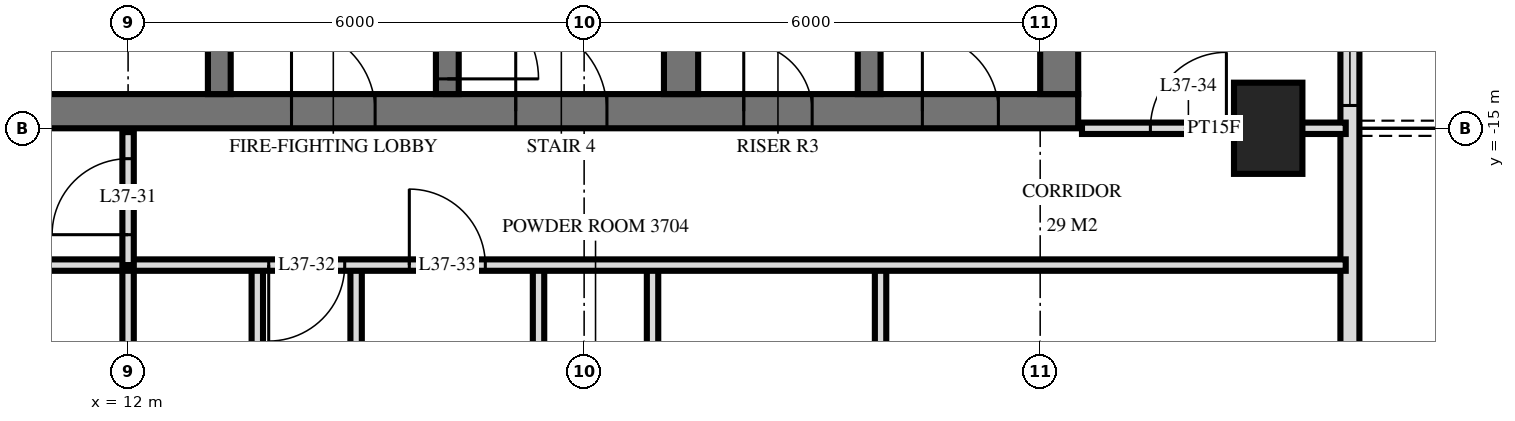
"""IFC4 building model, lengths in metres.
Left out: names, types, materials, properties, quantities, classifications, styles, units other than length and angle.
Written with IfcOpenShell. Run it as: python <this file> out.ifc"""

import sys

from ifc_helpers import new_model, si_unit, direction, frame, frame_2d, origin, origin_2d, place, context, subcontext, project, spatial, rectangle, extrude, element, fill, save


model = new_model("IFC4")
c1 = context("Model", 3, precision=1e-05, world=origin(), true_north=direction((0.0, 1.0)))
c2 = subcontext(c1, "Body", "Model", "MODEL_VIEW")
j1 = project(units=[si_unit("LENGTHUNIT", "METRE"), si_unit("PLANEANGLEUNIT", "RADIAN")], contexts=[c1])
p1 = place(None, origin())
s1 = spatial("IfcSite", under=j1, at=p1, CompositionType="ELEMENT")
p2 = place(p1, origin())
s2 = spatial("IfcBuilding", under=s1, at=p2, CompositionType="ELEMENT")
p3 = place(p2, frame((0.0, 0.0, 145.2)))
s3 = spatial("IfcBuildingStorey", under=s2, at=p3, CompositionType="ELEMENT", Elevation=145.2)
p4 = place(p3, frame((27.0, -15.0, 0.0), z_axis=(0.0, 0.0, 1.0), x_axis=(0.0, 1.0, 0.0)))
e1 = element("IfcColumn", 1, at=p4, inside=s3, PredefinedType="COLUMN", context=c2, shape_type="SweptSolid", body=[
    extrude(rectangle(XDim=1.2, YDim=0.9, at=origin_2d()), origin(), (0.0, 0.0, 1.0), 3.6),
])
p5 = place(p3, frame((10.0, -14.775, 0.0), z_axis=(0.0, 0.0, 1.0), x_axis=(1.0, 0.0, 0.0)))
e2 = element("IfcWall", 2, at=p5, inside=s3, PredefinedType="SHEAR", context=c2, shape_type="SweptSolid", body=[
    extrude(rectangle(XDim=14.5, YDim=0.45, at=frame_2d((7.25, 0.0))), origin(), (0.0, 0.0, 1.0), 3.6),
])
p6 = place(p5, frame((7.1, 0.0, 0.0)))
e3 = element("IfcOpeningElement", 3, at=p6, cuts=e2, PredefinedType="OPENING", context=c2, shape_type="SweptSolid", body=[
    extrude(rectangle(XDim=1.2, YDim=2.1, at=frame_2d((0.6, 1.05))), frame((0.0, 0.235, 0.0), z_axis=(0.0, -1.0, 0.0), x_axis=(1.0, 0.0, 0.0)), (0.0, 0.0, 1.0), 0.47),
])
p7 = place(p5, frame((4.15, 0.0, 0.0)))
e4 = element("IfcOpeningElement", 4, at=p7, cuts=e2, PredefinedType="OPENING", context=c2, shape_type="SweptSolid", body=[
    extrude(rectangle(XDim=1.1, YDim=2.1, at=frame_2d((0.55, 1.05))), frame((0.0, 0.235, 0.0), z_axis=(0.0, -1.0, 0.0), x_axis=(1.0, 0.0, 0.0)), (0.0, 0.0, 1.0), 0.47),
])
p8 = place(p5, frame((10.1, 0.0, 0.0)))
e5 = element("IfcOpeningElement", 5, at=p8, cuts=e2, PredefinedType="OPENING", context=c2, shape_type="SweptSolid", body=[
    extrude(rectangle(XDim=0.9, YDim=2.1, at=frame_2d((0.45, 1.05))), frame((0.0, 0.235, 0.0), z_axis=(0.0, -1.0, 0.0), x_axis=(1.0, 0.0, 0.0)), (0.0, 0.0, 1.0), 0.47),
])
p9 = place(p5, frame((12.45, 0.0, 0.0)))
e6 = element("IfcOpeningElement", 6, at=p9, cuts=e2, PredefinedType="OPENING", context=c2, shape_type="SweptSolid", body=[
    extrude(rectangle(XDim=1.0, YDim=2.1, at=frame_2d((0.5, 1.05))), frame((0.0, 0.235, 0.0), z_axis=(0.0, -1.0, 0.0), x_axis=(1.0, 0.0, 0.0)), (0.0, 0.0, 1.0), 0.47),
])
p10 = place(p3, frame((24.25, -14.55, 0.0), z_axis=(0.0, 0.0, 1.0), x_axis=(0.0, 1.0, 0.0)))
e7 = element("IfcWall", 7, at=p10, inside=s3, PredefinedType="SHEAR", context=c2, shape_type="SweptSolid", body=[
    extrude(rectangle(XDim=14.1, YDim=0.5, at=frame_2d((7.05, 0.0))), origin(), (0.0, 0.0, 1.0), 3.6),
])
p11 = place(p3, frame((13.2, -14.55, 0.0), z_axis=(0.0, 0.0, 1.0), x_axis=(0.0, 1.0, 0.0)))
e8 = element("IfcWall", 8, at=p11, inside=s3, PredefinedType="SHEAR", context=c2, shape_type="SweptSolid", body=[
    extrude(rectangle(XDim=5.4, YDim=0.3, at=frame_2d((2.7, 0.0))), origin(), (0.0, 0.0, 1.0), 3.6),
])
p12 = place(p11, frame((4.0, 0.0, 0.0)))
e9 = element("IfcOpeningElement", 9, at=p12, cuts=e8, PredefinedType="OPENING", context=c2, shape_type="SweptSolid", body=[
    extrude(rectangle(XDim=1.2, YDim=2.1, at=frame_2d((0.6, 1.05))), frame((0.0, 0.16, 0.0), z_axis=(0.0, -1.0, 0.0), x_axis=(1.0, 0.0, 0.0)), (0.0, 0.0, 1.0), 0.32),
])
p13 = place(p3, frame((16.2, -14.55, 0.0), z_axis=(0.0, 0.0, 1.0), x_axis=(0.0, 1.0, 0.0)))
e10 = element("IfcWall", 10, at=p13, inside=s3, PredefinedType="SHEAR", context=c2, shape_type="SweptSolid", body=[
    extrude(rectangle(XDim=5.4, YDim=0.3, at=frame_2d((2.7, 0.0))), origin(), (0.0, 0.0, 1.0), 3.6),
])
p14 = place(p13, frame((0.2, 0.0, 0.0)))
e11 = element("IfcOpeningElement", 11, at=p14, cuts=e10, PredefinedType="OPENING", context=c2, shape_type="SweptSolid", body=[
    extrude(rectangle(XDim=1.2, YDim=2.1, at=frame_2d((0.6, 1.05))), frame((0.0, 0.16, 0.0), z_axis=(0.0, -1.0, 0.0), x_axis=(1.0, 0.0, 0.0)), (0.0, 0.0, 1.0), 0.32),
])
p15 = place(p3, frame((19.275, -14.55, 0.0), z_axis=(0.0, 0.0, 1.0), x_axis=(0.0, 1.0, 0.0)))
e12 = element("IfcWall", 12, at=p15, inside=s3, PredefinedType="SHEAR", context=c2, shape_type="SweptSolid", body=[
    extrude(rectangle(XDim=5.4, YDim=0.45, at=frame_2d((2.7, 0.0))), origin(), (0.0, 0.0, 1.0), 3.6),
])
p16 = place(p3, frame((21.75, -14.55, 0.0), z_axis=(0.0, 0.0, 1.0), x_axis=(0.0, 1.0, 0.0)))
e13 = element("IfcWall", 13, at=p16, inside=s3, PredefinedType="SHEAR", context=c2, shape_type="SweptSolid", body=[
    extrude(rectangle(XDim=5.4, YDim=0.3, at=frame_2d((2.7, 0.0))), origin(), (0.0, 0.0, 1.0), 3.6),
])
p17 = place(p3, frame((28.075, -29.275, 0.0), z_axis=(0.0, 0.0, 1.0), x_axis=(0.0, 1.0, 0.0)))
e14 = element("IfcWall", 14, at=p17, inside=s3, PredefinedType="SOLIDWALL", context=c2, shape_type="SweptSolid", body=[
    extrude(rectangle(XDim=25.951, YDim=0.25, at=frame_2d((12.975, 0.0))), origin(), (0.0, 0.0, 1.0), 3.32),
])
p18 = place(p17, frame((0.575, 0.0, 0.0)))
e15 = element("IfcOpeningElement", 15, at=p18, cuts=e14, PredefinedType="OPENING", context=c2, shape_type="SweptSolid", body=[
    extrude(rectangle(XDim=1.8, YDim=2.4, at=frame_2d((0.9, 1.2))), frame((0.0, 0.135, 0.0), z_axis=(0.0, -1.0, 0.0), x_axis=(1.0, 0.0, 0.0)), (0.0, 0.0, 1.0), 0.27),
])
p19 = place(p17, frame((3.325, 0.0, 0.3)))
e16 = element("IfcOpeningElement", 16, at=p19, cuts=e14, PredefinedType="OPENING", context=c2, shape_type="SweptSolid", body=[
    extrude(rectangle(XDim=1.8, YDim=2.1, at=frame_2d((0.9, 1.05))), frame((0.0, 0.135, 0.0), z_axis=(0.0, -1.0, 0.0), x_axis=(1.0, 0.0, 0.0)), (0.0, 0.0, 1.0), 0.27),
])
p20 = place(p17, frame((9.475, 0.0, 0.0)))
e17 = element("IfcOpeningElement", 17, at=p20, cuts=e14, PredefinedType="OPENING", context=c2, shape_type="SweptSolid", body=[
    extrude(rectangle(XDim=1.8, YDim=2.4, at=frame_2d((0.9, 1.2))), frame((0.0, 0.135, 0.0), z_axis=(0.0, -1.0, 0.0), x_axis=(1.0, 0.0, 0.0)), (0.0, 0.0, 1.0), 0.27),
])
p21 = place(p17, frame((14.575, 0.0, 0.3)))
e18 = element("IfcOpeningElement", 18, at=p21, cuts=e14, PredefinedType="OPENING", context=c2, shape_type="SweptSolid", body=[
    extrude(rectangle(XDim=2.4, YDim=2.1, at=frame_2d((1.2, 1.05))), frame((0.0, 0.135, 0.0), z_axis=(0.0, -1.0, 0.0), x_axis=(1.0, 0.0, 0.0)), (0.0, 0.0, 1.0), 0.27),
])
p22 = place(p17, frame((17.875, 0.0, 0.0)))
e19 = element("IfcOpeningElement", 19, at=p22, cuts=e14, PredefinedType="OPENING", context=c2, shape_type="SweptSolid", body=[
    extrude(rectangle(XDim=1.8, YDim=2.4, at=frame_2d((0.9, 1.2))), frame((0.0, 0.135, 0.0), z_axis=(0.0, -1.0, 0.0), x_axis=(1.0, 0.0, 0.0)), (0.0, 0.0, 1.0), 0.27),
])
p23 = place(p3, frame((21.9, -21.0, 0.0), z_axis=(0.0, 0.0, 1.0), x_axis=(0.0, 1.0, 0.0)))
e20 = element("IfcWall", 20, at=p23, inside=s3, PredefinedType="PARTITIONING", context=c2, shape_type="SweptSolid", body=[
    extrude(rectangle(XDim=4.2, YDim=0.15, at=frame_2d((2.1, 0.0))), origin(), (0.0, 0.0, 1.0), 3.32),
])
p24 = place(p3, frame((18.9, -21.0, 0.0), z_axis=(0.0, 0.0, 1.0), x_axis=(0.0, 1.0, 0.0)))
e21 = element("IfcWall", 21, at=p24, inside=s3, PredefinedType="PLUMBINGWALL", context=c2, shape_type="SweptSolid", body=[
    extrude(rectangle(XDim=4.2, YDim=0.15, at=frame_2d((2.1, 0.0))), origin(), (0.0, 0.0, 1.0), 3.32),
])
p25 = place(p3, frame((17.4, -21.0, 0.0), z_axis=(0.0, 0.0, 1.0), x_axis=(0.0, 1.0, 0.0)))
e22 = element("IfcWall", 22, at=p25, inside=s3, PredefinedType="PARTITIONING", context=c2, shape_type="SweptSolid", body=[
    extrude(rectangle(XDim=4.2, YDim=0.15, at=frame_2d((2.1, 0.0))), origin(), (0.0, 0.0, 1.0), 3.32),
])
p26 = place(p25, frame((1.6, 0.0, 0.0)))
e23 = element("IfcOpeningElement", 23, at=p26, cuts=e22, PredefinedType="OPENING", context=c2, shape_type="SweptSolid", body=[
    extrude(rectangle(XDim=1.0, YDim=2.1, at=frame_2d((0.5, 1.05))), frame((0.0, 0.085, 0.0), z_axis=(0.0, -1.0, 0.0), x_axis=(1.0, 0.0, 0.0)), (0.0, 0.0, 1.0), 0.17),
])
p27 = place(p3, frame((15.0, -21.0, 0.0), z_axis=(0.0, 0.0, 1.0), x_axis=(0.0, 1.0, 0.0)))
e24 = element("IfcWall", 24, at=p27, inside=s3, PredefinedType="PARTITIONING", context=c2, shape_type="SweptSolid", body=[
    extrude(rectangle(XDim=4.2, YDim=0.15, at=frame_2d((2.1, 0.0))), origin(), (0.0, 0.0, 1.0), 3.32),
])
p28 = place(p3, frame((13.7, -21.8, 0.0), z_axis=(0.0, 0.0, 1.0), x_axis=(0.0, 1.0, 0.0)))
e25 = element("IfcWall", 25, at=p28, inside=s3, PredefinedType="PARTITIONING", context=c2, shape_type="SweptSolid", body=[
    extrude(rectangle(XDim=5.0, YDim=0.15, at=frame_2d((2.5, 0.0))), origin(), (0.0, 0.0, 1.0), 3.32),
])
p29 = place(p28, frame((2.1, 0.0, 0.0)))
e26 = element("IfcOpeningElement", 26, at=p29, cuts=e25, PredefinedType="OPENING", context=c2, shape_type="SweptSolid", body=[
    extrude(rectangle(XDim=0.8, YDim=2.1, at=frame_2d((0.4, 1.05))), frame((0.0, 0.085, 0.0), z_axis=(0.0, -1.0, 0.0), x_axis=(1.0, 0.0, 0.0)), (0.0, 0.0, 1.0), 0.17),
])
p30 = place(p3, frame((12.0, -16.8, 0.0), z_axis=(0.0, 0.0, 1.0), x_axis=(0.0, 1.0, 0.0)))
e27 = element("IfcWall", 27, at=p30, inside=s3, PredefinedType="PARTITIONING", context=c2, shape_type="SweptSolid", body=[
    extrude(rectangle(XDim=1.75, YDim=0.15, at=frame_2d((0.875, 0.0))), origin(), (0.0, 0.0, 1.0), 3.32),
])
p31 = place(p30, frame((0.4, 0.0, 0.0)))
e28 = element("IfcOpeningElement", 28, at=p31, cuts=e27, PredefinedType="OPENING", context=c2, shape_type="SweptSolid", body=[
    extrude(rectangle(XDim=1.0, YDim=2.1, at=frame_2d((0.5, 1.05))), frame((0.0, 0.085, 0.0), z_axis=(0.0, -1.0, 0.0), x_axis=(1.0, 0.0, 0.0)), (0.0, 0.0, 1.0), 0.17),
])
p32 = place(p3, frame((12.0, -33.62, 0.0), z_axis=(0.0, 0.0, 1.0), x_axis=(0.0, 1.0, 0.0)))
e29 = element("IfcWall", 29, at=p32, inside=s3, PredefinedType="PARTITIONING", context=c2, shape_type="SweptSolid", body=[
    extrude(rectangle(XDim=16.82, YDim=0.15, at=frame_2d((8.41, 0.0))), origin(), (0.0, 0.0, 1.0), 3.32),
])
p33 = place(p3, frame((-28.02, -16.8, 0.0), z_axis=(0.0, 0.0, 1.0), x_axis=(1.0, 0.0, 0.0)))
e30 = element("IfcWall", 30, at=p33, inside=s3, PredefinedType="PARTITIONING", context=c2, shape_type="SweptSolid", body=[
    extrude(rectangle(XDim=56.04, YDim=0.15, at=frame_2d((28.02, 0.0))), origin(), (0.0, 0.0, 1.0), 3.32),
])
p34 = place(p33, frame((13.17, 0.0, 0.0)))
e31 = element("IfcOpeningElement", 31, at=p34, cuts=e30, PredefinedType="OPENING", context=c2, shape_type="SweptSolid", body=[
    extrude(rectangle(XDim=1.0, YDim=2.1, at=frame_2d((0.5, 1.05))), frame((0.0, 0.085, 0.0), z_axis=(0.0, -1.0, 0.0), x_axis=(1.0, 0.0, 0.0)), (0.0, 0.0, 1.0), 0.17),
])
p35 = place(p33, frame((11.32, 0.0, 0.0)))
e32 = element("IfcOpeningElement", 32, at=p35, cuts=e30, PredefinedType="OPENING", context=c2, shape_type="SweptSolid", body=[
    extrude(rectangle(XDim=1.0, YDim=2.1, at=frame_2d((0.5, 1.05))), frame((0.0, 0.085, 0.0), z_axis=(0.0, -1.0, 0.0), x_axis=(1.0, 0.0, 0.0)), (0.0, 0.0, 1.0), 0.17),
])
p36 = place(p33, frame((41.87, 0.0, 0.0)))
e33 = element("IfcOpeningElement", 33, at=p36, cuts=e30, PredefinedType="OPENING", context=c2, shape_type="SweptSolid", body=[
    extrude(rectangle(XDim=1.0, YDim=2.1, at=frame_2d((0.5, 1.05))), frame((0.0, 0.085, 0.0), z_axis=(0.0, -1.0, 0.0), x_axis=(1.0, 0.0, 0.0)), (0.0, 0.0, 1.0), 0.17),
])
p37 = place(p33, frame((43.72, 0.0, 0.0)))
e34 = element("IfcOpeningElement", 34, at=p37, cuts=e30, PredefinedType="OPENING", context=c2, shape_type="SweptSolid", body=[
    extrude(rectangle(XDim=1.0, YDim=2.1, at=frame_2d((0.5, 1.05))), frame((0.0, 0.085, 0.0), z_axis=(0.0, -1.0, 0.0), x_axis=(1.0, 0.0, 0.0)), (0.0, 0.0, 1.0), 0.17),
])
p38 = place(p33, frame((19.52, 0.0, 0.0)))
e35 = element("IfcOpeningElement", 35, at=p38, cuts=e30, PredefinedType="OPENING", context=c2, shape_type="SweptSolid", body=[
    extrude(rectangle(XDim=1.0, YDim=2.1, at=frame_2d((0.5, 1.05))), frame((0.0, 0.085, 0.0), z_axis=(0.0, -1.0, 0.0), x_axis=(1.0, 0.0, 0.0)), (0.0, 0.0, 1.0), 0.17),
])
p39 = place(p33, frame((27.52, 0.0, 0.0)))
e36 = element("IfcOpeningElement", 36, at=p39, cuts=e30, PredefinedType="OPENING", context=c2, shape_type="SweptSolid", body=[
    extrude(rectangle(XDim=1.0, YDim=2.1, at=frame_2d((0.5, 1.05))), frame((0.0, 0.085, 0.0), z_axis=(0.0, -1.0, 0.0), x_axis=(1.0, 0.0, 0.0)), (0.0, 0.0, 1.0), 0.17),
])
p40 = place(p33, frame((35.52, 0.0, 0.0)))
e37 = element("IfcOpeningElement", 37, at=p40, cuts=e30, PredefinedType="OPENING", context=c2, shape_type="SweptSolid", body=[
    extrude(rectangle(XDim=1.0, YDim=2.1, at=frame_2d((0.5, 1.05))), frame((0.0, 0.085, 0.0), z_axis=(0.0, -1.0, 0.0), x_axis=(1.0, 0.0, 0.0)), (0.0, 0.0, 1.0), 0.17),
])
p41 = place(p3, frame((24.55, -15.0, 0.0), z_axis=(0.0, 0.0, 1.0), x_axis=(1.0, 0.0, 0.0)))
e38 = element("IfcWall", 38, at=p41, inside=s3, PredefinedType="PARTITIONING", context=c2, shape_type="SweptSolid", body=[
    extrude(rectangle(XDim=3.47, YDim=0.15, at=frame_2d((1.735, 0.0))), origin(), (0.0, 0.0, 1.0), 3.32),
])
p42 = place(p41, frame((0.9, 0.0, 0.0)))
e39 = element("IfcOpeningElement", 39, at=p42, cuts=e38, PredefinedType="OPENING", context=c2, shape_type="SweptSolid", body=[
    extrude(rectangle(XDim=1.0, YDim=2.1, at=frame_2d((0.5, 1.05))), frame((0.0, 0.085, 0.0), z_axis=(0.0, -1.0, 0.0), x_axis=(1.0, 0.0, 0.0)), (0.0, 0.0, 1.0), 0.17),
])
p43 = place(p21, origin())
e40 = element("IfcWindow", 40, at=p43, inside=s3, PartitioningType="SINGLE_PANEL", PredefinedType="WINDOW", context=c2, shape_type="SweptSolid", body=[
    extrude(rectangle(XDim=2.4, YDim=2.1, at=frame_2d((1.2, 1.05))), frame((0.0, 0.03, 0.0), z_axis=(0.0, -1.0, 0.0), x_axis=(1.0, 0.0, 0.0)), (0.0, 0.0, 1.0), 0.06),
])
fill(e18, e40)
p44 = place(p6, origin())
e41 = element("IfcDoor", 41, at=p44, inside=s3, OperationType="SINGLE_SWING_RIGHT", PredefinedType="DOOR", context=c2, shape_type="SweptSolid", body=[
    extrude(rectangle(XDim=1.2, YDim=2.1, at=frame_2d((0.6, 1.05))), frame((0.0, 0.025, 0.0), z_axis=(0.0, -1.0, 0.0), x_axis=(1.0, 0.0, 0.0)), (0.0, 0.0, 1.0), 0.05),
])
fill(e3, e41)
p45 = place(p7, origin())
e42 = element("IfcDoor", 42, at=p45, inside=s3, OperationType="SINGLE_SWING_RIGHT", PredefinedType="DOOR", context=c2, shape_type="SweptSolid", body=[
    extrude(rectangle(XDim=1.1, YDim=2.1, at=frame_2d((0.55, 1.05))), frame((0.0, 0.025, 0.0), z_axis=(0.0, -1.0, 0.0), x_axis=(1.0, 0.0, 0.0)), (0.0, 0.0, 1.0), 0.05),
])
fill(e4, e42)
p46 = place(p8, origin())
e43 = element("IfcDoor", 43, at=p46, inside=s3, OperationType="SINGLE_SWING_RIGHT", PredefinedType="DOOR", context=c2, shape_type="SweptSolid", body=[
    extrude(rectangle(XDim=0.9, YDim=2.1, at=frame_2d((0.45, 1.05))), frame((0.0, 0.025, 0.0), z_axis=(0.0, -1.0, 0.0), x_axis=(1.0, 0.0, 0.0)), (0.0, 0.0, 1.0), 0.05),
])
fill(e5, e43)
p47 = place(p9, origin())
e44 = element("IfcDoor", 44, at=p47, inside=s3, OperationType="SINGLE_SWING_RIGHT", PredefinedType="DOOR", context=c2, shape_type="SweptSolid", body=[
    extrude(rectangle(XDim=1.0, YDim=2.1, at=frame_2d((0.5, 1.05))), frame((0.0, 0.025, 0.0), z_axis=(0.0, -1.0, 0.0), x_axis=(1.0, 0.0, 0.0)), (0.0, 0.0, 1.0), 0.05),
])
fill(e6, e44)
p48 = place(p14, frame((0.6, 0.0, 0.0), z_axis=(0.0, 0.0, 1.0), x_axis=(-1.0, 0.0, 0.0)))
e45 = element("IfcDoor", 45, at=p48, inside=s3, OperationType="SINGLE_SWING_LEFT", PredefinedType="DOOR", context=c2, shape_type="SweptSolid", body=[
    extrude(rectangle(XDim=1.2, YDim=2.1, at=frame_2d((0.0, 1.05))), frame((0.0, -0.025, 0.0), z_axis=(0.0, 1.0, 0.0), x_axis=(-1.0, 0.0, 0.0)), (0.0, 0.0, 1.0), 0.05),
])
fill(e11, e45)
p49 = place(p31, origin())
e46 = element("IfcDoor", 46, at=p49, inside=s3, OperationType="SINGLE_SWING_RIGHT", PredefinedType="DOOR", context=c2, shape_type="SweptSolid", body=[
    extrude(rectangle(XDim=1.0, YDim=2.1, at=frame_2d((0.5, 1.05))), frame((0.0, 0.025, 0.0), z_axis=(0.0, -1.0, 0.0), x_axis=(1.0, 0.0, 0.0)), (0.0, 0.0, 1.0), 0.05),
])
fill(e28, e46)
p50 = place(p36, frame((0.5, 0.0, 0.0), z_axis=(0.0, 0.0, 1.0), x_axis=(-1.0, 0.0, 0.0)))
e47 = element("IfcDoor", 47, at=p50, inside=s3, OperationType="SINGLE_SWING_LEFT", PredefinedType="DOOR", context=c2, shape_type="SweptSolid", body=[
    extrude(rectangle(XDim=1.0, YDim=2.1, at=frame_2d((0.0, 1.05))), frame((0.0, -0.025, 0.0), z_axis=(0.0, 1.0, 0.0), x_axis=(-1.0, 0.0, 0.0)), (0.0, 0.0, 1.0), 0.05),
])
fill(e33, e47)
p51 = place(p37, origin())
e48 = element("IfcDoor", 48, at=p51, inside=s3, OperationType="SINGLE_SWING_RIGHT", PredefinedType="DOOR", context=c2, shape_type="SweptSolid", body=[
    extrude(rectangle(XDim=1.0, YDim=2.1, at=frame_2d((0.5, 1.05))), frame((0.0, 0.025, 0.0), z_axis=(0.0, -1.0, 0.0), x_axis=(1.0, 0.0, 0.0)), (0.0, 0.0, 1.0), 0.05),
])
fill(e34, e48)
p52 = place(p42, origin())
e49 = element("IfcDoor", 49, at=p52, inside=s3, OperationType="SINGLE_SWING_LEFT", PredefinedType="DOOR", context=c2, shape_type="SweptSolid", body=[
    extrude(rectangle(XDim=1.0, YDim=2.1, at=frame_2d((0.5, 1.05))), frame((0.0, 0.025, 0.0), z_axis=(0.0, -1.0, 0.0), x_axis=(1.0, 0.0, 0.0)), (0.0, 0.0, 1.0), 0.05),
])
fill(e39, e49)
save(model, sys.argv[1])
